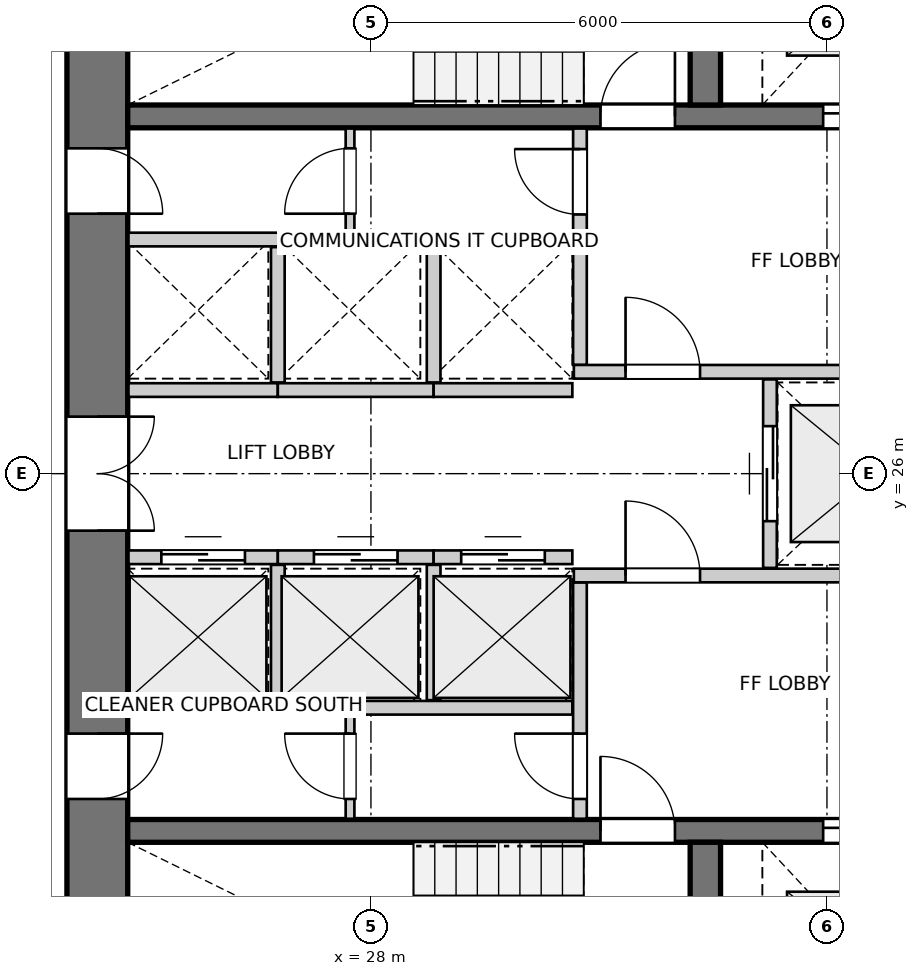
"""IFC4 building model, lengths in metres.
Left out: names, types, materials, properties, quantities, classifications, styles, units other than length and angle.
Written with IfcOpenShell. Run it as: python <this file> out.ifc"""

import sys

from ifc_helpers import new_model, si_unit, direction, frame, frame_2d, origin, place, context, subcontext, project, spatial, rectangle, extrude, source, transform, mapped, element, fill, save


model = new_model("IFC4")
c1 = context("Model", 3, precision=1e-05, world=origin(), true_north=direction((0.0, 1.0)))
c2 = subcontext(c1, "Body", "Model", "MODEL_VIEW")
j1 = project(units=[si_unit("LENGTHUNIT", "METRE"), si_unit("PLANEANGLEUNIT", "RADIAN")], contexts=[c1])
p1 = place(None, origin())
s1 = spatial("IfcSite", under=j1, at=p1, CompositionType="ELEMENT")
p2 = place(p1, origin())
s2 = spatial("IfcBuilding", under=s1, at=p2, CompositionType="ELEMENT")
p3 = place(p2, frame((0.0, 0.0, 17.4)))
s3 = spatial("IfcBuildingStorey", under=s2, at=p3, CompositionType="ELEMENT", Elevation=17.4)
p4 = place(p3, frame((24.4, 33.8, 0.0), z_axis=(0.0, 0.0, 1.0), x_axis=(0.0, -1.0, 0.0)))
e1 = element("IfcWall", 1, at=p4, inside=s3, PredefinedType="SHEAR", context=c2, shape_type="SweptSolid", body=[
    extrude(rectangle(XDim=15.6, YDim=0.8, at=frame_2d((7.8, 0.0))), origin(), (0.0, 0.0, 1.0), 2.94),
])
p5 = place(p4, frame((7.05, 0.0, 0.0)))
e2 = element("IfcOpeningElement", 2, at=p5, cuts=e1, PredefinedType="OPENING", context=c2, shape_type="SweptSolid", body=[
    extrude(rectangle(XDim=1.5, YDim=2.15, at=frame_2d((0.75, 1.075))), frame((0.0, 0.41, 0.0), z_axis=(0.0, -1.0, 0.0), x_axis=(1.0, 0.0, 0.0)), (0.0, 0.0, 1.0), 0.82),
])
p6 = place(p4, frame((3.52, 0.0, 0.0)))
e3 = element("IfcOpeningElement", 3, at=p6, cuts=e1, PredefinedType="OPENING", context=c2, shape_type="SweptSolid", body=[
    extrude(rectangle(XDim=0.86, YDim=2.05, at=frame_2d((0.43, 1.025))), frame((0.0, 0.41, 0.0), z_axis=(0.0, -1.0, 0.0), x_axis=(1.0, 0.0, 0.0)), (0.0, 0.0, 1.0), 0.82),
])
p7 = place(p4, frame((11.22, 0.0, 0.0)))
e4 = element("IfcOpeningElement", 4, at=p7, cuts=e1, PredefinedType="OPENING", context=c2, shape_type="SweptSolid", body=[
    extrude(rectangle(XDim=0.86, YDim=2.05, at=frame_2d((0.43, 1.025))), frame((0.0, 0.41, 0.0), z_axis=(0.0, -1.0, 0.0), x_axis=(1.0, 0.0, 0.0)), (0.0, 0.0, 1.0), 0.82),
])
p8 = place(p3, frame((24.8, 21.3, 0.0), z_axis=(0.0, 0.0, 1.0), x_axis=(1.0, 0.0, 0.0)))
e5 = element("IfcWall", 5, at=p8, inside=s3, PredefinedType="SHEAR", context=c2, shape_type="SweptSolid", body=[
    extrude(rectangle(XDim=11.1, YDim=0.3, at=frame_2d((5.55, 0.0))), origin(), (0.0, 0.0, 1.0), 2.94),
])
p9 = place(p8, frame((6.22, 0.0, 0.0)))
e6 = element("IfcOpeningElement", 6, at=p9, cuts=e5, PredefinedType="OPENING", context=c2, shape_type="SweptSolid", body=[
    extrude(rectangle(XDim=0.98, YDim=2.15, at=frame_2d((0.49, 1.075))), frame((0.0, 0.16, 0.0), z_axis=(0.0, -1.0, 0.0), x_axis=(1.0, 0.0, 0.0)), (0.0, 0.0, 1.0), 0.32),
])
p10 = place(p8, frame((9.15, 0.0, 0.0)))
e7 = element("IfcOpeningElement", 7, at=p10, cuts=e5, PredefinedType="OPENING", context=c2, shape_type="SweptSolid", body=[
    extrude(rectangle(XDim=1.15, YDim=2.15, at=frame_2d((0.575, 1.075))), frame((0.0, 0.16, 0.0), z_axis=(0.0, -1.0, 0.0), x_axis=(1.0, 0.0, 0.0)), (0.0, 0.0, 1.0), 0.32),
])
p11 = place(p3, frame((32.4, 18.2, 0.0), z_axis=(0.0, 0.0, 1.0), x_axis=(0.0, 1.0, 0.0)))
e8 = element("IfcWall", 8, at=p11, inside=s3, PredefinedType="SHEAR", context=c2, shape_type="SweptSolid", body=[
    extrude(rectangle(XDim=2.95, YDim=0.4, at=frame_2d((1.475, 0.0))), origin(), (0.0, 0.0, 1.0), 2.94),
])
p12 = place(p3, frame((24.8, 30.7, 0.0), z_axis=(0.0, 0.0, 1.0), x_axis=(1.0, 0.0, 0.0)))
e9 = element("IfcWall", 9, at=p12, inside=s3, PredefinedType="SHEAR", context=c2, shape_type="SweptSolid", body=[
    extrude(rectangle(XDim=11.1, YDim=0.3, at=frame_2d((5.55, 0.0))), origin(), (0.0, 0.0, 1.0), 2.94),
])
p13 = place(p12, frame((6.22, 0.0, 0.0)))
e10 = element("IfcOpeningElement", 10, at=p13, cuts=e9, PredefinedType="OPENING", context=c2, shape_type="SweptSolid", body=[
    extrude(rectangle(XDim=0.98, YDim=2.15, at=frame_2d((0.49, 1.075))), frame((0.0, 0.16, 0.0), z_axis=(0.0, -1.0, 0.0), x_axis=(1.0, 0.0, 0.0)), (0.0, 0.0, 1.0), 0.32),
])
p14 = place(p12, frame((9.15, 0.0, 0.0)))
e11 = element("IfcOpeningElement", 11, at=p14, cuts=e9, PredefinedType="OPENING", context=c2, shape_type="SweptSolid", body=[
    extrude(rectangle(XDim=1.15, YDim=2.15, at=frame_2d((0.575, 1.075))), frame((0.0, 0.16, 0.0), z_axis=(0.0, -1.0, 0.0), x_axis=(1.0, 0.0, 0.0)), (0.0, 0.0, 1.0), 0.32),
])
p15 = place(p3, frame((32.4, 30.85, 0.0), z_axis=(0.0, 0.0, 1.0), x_axis=(0.0, 1.0, 0.0)))
e12 = element("IfcWall", 12, at=p15, inside=s3, PredefinedType="SHEAR", context=c2, shape_type="SweptSolid", body=[
    extrude(rectangle(XDim=2.95, YDim=0.4, at=frame_2d((1.475, 0.0))), origin(), (0.0, 0.0, 1.0), 2.94),
])
p16 = place(p3, frame((30.75, 21.46, 0.0), z_axis=(0.0, 0.0, 1.0), x_axis=(0.0, 1.0, 0.0)))
e13 = element("IfcWall", 13, at=p16, inside=s3, PredefinedType="PARTITIONING", context=c2, shape_type="SweptSolid", body=[
    extrude(rectangle(XDim=3.11, YDim=0.18, at=frame_2d((1.555, 0.0))), origin(), (0.0, 0.0, 1.0), 2.94),
])
p17 = place(p16, frame((0.26, 0.0, 0.0)))
e14 = element("IfcOpeningElement", 14, at=p17, cuts=e13, PredefinedType="OPENING", context=c2, shape_type="SweptSolid", body=[
    extrude(rectangle(XDim=0.86, YDim=2.05, at=frame_2d((0.43, 1.025))), frame((0.0, 0.1, 0.0), z_axis=(0.0, -1.0, 0.0), x_axis=(1.0, 0.0, 0.0)), (0.0, 0.0, 1.0), 0.2),
])
p18 = place(p3, frame((30.67, 24.66, 0.0), z_axis=(0.0, 0.0, 1.0), x_axis=(1.0, 0.0, 0.0)))
e15 = element("IfcWall", 15, at=p18, inside=s3, PredefinedType="PARTITIONING", context=c2, shape_type="SweptSolid", body=[
    extrude(rectangle(XDim=5.22, YDim=0.18, at=frame_2d((2.61, 0.0))), origin(), (0.0, 0.0, 1.0), 2.94),
])
p19 = place(p18, frame((0.68, 0.0, 0.0)))
e16 = element("IfcOpeningElement", 16, at=p19, cuts=e15, PredefinedType="OPENING", context=c2, shape_type="SweptSolid", body=[
    extrude(rectangle(XDim=0.98, YDim=2.15, at=frame_2d((0.49, 1.075))), frame((0.0, 0.1, 0.0), z_axis=(0.0, -1.0, 0.0), x_axis=(1.0, 0.0, 0.0)), (0.0, 0.0, 1.0), 0.2),
])
p20 = place(p3, frame((30.75, 27.43, 0.0), z_axis=(0.0, 0.0, 1.0), x_axis=(0.0, 1.0, 0.0)))
e17 = element("IfcWall", 17, at=p20, inside=s3, PredefinedType="PARTITIONING", context=c2, shape_type="SweptSolid", body=[
    extrude(rectangle(XDim=3.11, YDim=0.18, at=frame_2d((1.555, 0.0))), origin(), (0.0, 0.0, 1.0), 2.94),
])
p21 = place(p20, frame((1.98, 0.0, 0.0)))
e18 = element("IfcOpeningElement", 18, at=p21, cuts=e17, PredefinedType="OPENING", context=c2, shape_type="SweptSolid", body=[
    extrude(rectangle(XDim=0.86, YDim=2.05, at=frame_2d((0.43, 1.025))), frame((0.0, 0.1, 0.0), z_axis=(0.0, -1.0, 0.0), x_axis=(1.0, 0.0, 0.0)), (0.0, 0.0, 1.0), 0.2),
])
p22 = place(p3, frame((30.67, 27.34, 0.0), z_axis=(0.0, 0.0, 1.0), x_axis=(1.0, 0.0, 0.0)))
e19 = element("IfcWall", 19, at=p22, inside=s3, PredefinedType="PARTITIONING", context=c2, shape_type="SweptSolid", body=[
    extrude(rectangle(XDim=5.22, YDim=0.18, at=frame_2d((2.61, 0.0))), origin(), (0.0, 0.0, 1.0), 2.94),
])
p23 = place(p22, frame((0.68, 0.0, 0.0)))
e20 = element("IfcOpeningElement", 20, at=p23, cuts=e19, PredefinedType="OPENING", context=c2, shape_type="SweptSolid", body=[
    extrude(rectangle(XDim=0.98, YDim=2.15, at=frame_2d((0.49, 1.075))), frame((0.0, 0.1, 0.0), z_axis=(0.0, -1.0, 0.0), x_axis=(1.0, 0.0, 0.0)), (0.0, 0.0, 1.0), 0.2),
])
p24 = place(p3, frame((33.25, 24.76, 0.0), z_axis=(0.0, 0.0, 1.0), x_axis=(0.0, 1.0, 0.0)))
e21 = element("IfcWall", 21, at=p24, inside=s3, PredefinedType="PARTITIONING", context=c2, shape_type="SweptSolid", body=[
    extrude(rectangle(XDim=2.48, YDim=0.18, at=frame_2d((1.24, 0.0))), origin(), (0.0, 0.0, 1.0), 2.94),
])
p25 = place(p24, frame((0.615, 0.0, 0.0)))
e22 = element("IfcOpeningElement", 22, at=p25, cuts=e21, PredefinedType="OPENING", context=c2, shape_type="SweptSolid", body=[
    extrude(rectangle(XDim=1.25, YDim=2.15, at=frame_2d((0.625, 1.075))), frame((0.0, 0.1, 0.0), z_axis=(0.0, -1.0, 0.0), x_axis=(1.0, 0.0, 0.0)), (0.0, 0.0, 1.0), 0.2),
])
p26 = place(p3, frame((24.81, 22.92, 0.0), z_axis=(0.0, 0.0, 1.0), x_axis=(1.0, 0.0, 0.0)))
e23 = element("IfcWall", 23, at=p26, inside=s3, PredefinedType="PARTITIONING", context=c2, shape_type="SweptSolid", body=[
    extrude(rectangle(XDim=5.84, YDim=0.18, at=frame_2d((2.92, 0.0))), origin(), (0.0, 0.0, 1.0), 2.94),
])
p27 = place(p3, frame((24.81, 24.9, 0.0), z_axis=(0.0, 0.0, 1.0), x_axis=(1.0, 0.0, 0.0)))
e24 = element("IfcWall", 24, at=p27, inside=s3, PredefinedType="PARTITIONING", context=c2, shape_type="SweptSolid", body=[
    extrude(rectangle(XDim=1.965, YDim=0.18, at=frame_2d((0.982, 0.0))), origin(), (0.0, 0.0, 1.0), 2.94),
])
p28 = place(p27, frame((0.433, 0.0, 0.0)))
e25 = element("IfcOpeningElement", 25, at=p28, cuts=e24, PredefinedType="OPENING", context=c2, shape_type="SweptSolid", body=[
    extrude(rectangle(XDim=1.1, YDim=2.15, at=frame_2d((0.55, 1.075))), frame((0.0, 0.1, 0.0), z_axis=(0.0, -1.0, 0.0), x_axis=(1.0, 0.0, 0.0)), (0.0, 0.0, 1.0), 0.2),
])
p29 = place(p3, frame((26.775, 24.9, 0.0), z_axis=(0.0, 0.0, 1.0), x_axis=(1.0, 0.0, 0.0)))
e26 = element("IfcWall", 26, at=p29, inside=s3, PredefinedType="PARTITIONING", context=c2, shape_type="SweptSolid", body=[
    extrude(rectangle(XDim=2.05, YDim=0.18, at=frame_2d((1.025, 0.0))), origin(), (0.0, 0.0, 1.0), 2.94),
])
p30 = place(p29, frame((0.475, 0.0, 0.0)))
e27 = element("IfcOpeningElement", 27, at=p30, cuts=e26, PredefinedType="OPENING", context=c2, shape_type="SweptSolid", body=[
    extrude(rectangle(XDim=1.1, YDim=2.15, at=frame_2d((0.55, 1.075))), frame((0.0, 0.1, 0.0), z_axis=(0.0, -1.0, 0.0), x_axis=(1.0, 0.0, 0.0)), (0.0, 0.0, 1.0), 0.2),
])
p31 = place(p3, frame((26.775, 23.02, 0.0), z_axis=(0.0, 0.0, 1.0), x_axis=(0.0, 1.0, 0.0)))
e28 = element("IfcWall", 28, at=p31, inside=s3, PredefinedType="PARTITIONING", context=c2, shape_type="SweptSolid", body=[
    extrude(rectangle(XDim=1.78, YDim=0.18, at=frame_2d((0.89, 0.0))), origin(), (0.0, 0.0, 1.0), 2.94),
])
p32 = place(p3, frame((28.825, 24.9, 0.0), z_axis=(0.0, 0.0, 1.0), x_axis=(1.0, 0.0, 0.0)))
e29 = element("IfcWall", 29, at=p32, inside=s3, PredefinedType="PARTITIONING", context=c2, shape_type="SweptSolid", body=[
    extrude(rectangle(XDim=1.825, YDim=0.18, at=frame_2d((0.913, 0.0))), origin(), (0.0, 0.0, 1.0), 2.94),
])
p33 = place(p32, frame((0.363, 0.0, 0.0)))
e30 = element("IfcOpeningElement", 30, at=p33, cuts=e29, PredefinedType="OPENING", context=c2, shape_type="SweptSolid", body=[
    extrude(rectangle(XDim=1.1, YDim=2.15, at=frame_2d((0.55, 1.075))), frame((0.0, 0.1, 0.0), z_axis=(0.0, -1.0, 0.0), x_axis=(1.0, 0.0, 0.0)), (0.0, 0.0, 1.0), 0.2),
])
p34 = place(p3, frame((28.825, 23.02, 0.0), z_axis=(0.0, 0.0, 1.0), x_axis=(0.0, 1.0, 0.0)))
e31 = element("IfcWall", 31, at=p34, inside=s3, PredefinedType="PARTITIONING", context=c2, shape_type="SweptSolid", body=[
    extrude(rectangle(XDim=1.78, YDim=0.18, at=frame_2d((0.89, 0.0))), origin(), (0.0, 0.0, 1.0), 2.94),
])
p35 = place(p3, frame((24.81, 29.08, 0.0), z_axis=(0.0, 0.0, 1.0), x_axis=(1.0, 0.0, 0.0)))
e32 = element("IfcWall", 32, at=p35, inside=s3, PredefinedType="PARTITIONING", context=c2, shape_type="SweptSolid", body=[
    extrude(rectangle(XDim=5.84, YDim=0.18, at=frame_2d((2.92, 0.0))), origin(), (0.0, 0.0, 1.0), 2.94),
])
p36 = place(p3, frame((24.81, 27.1, 0.0), z_axis=(0.0, 0.0, 1.0), x_axis=(1.0, 0.0, 0.0)))
e33 = element("IfcWall", 33, at=p36, inside=s3, PredefinedType="PARTITIONING", context=c2, shape_type="SweptSolid", body=[
    extrude(rectangle(XDim=1.965, YDim=0.18, at=frame_2d((0.982, 0.0))), origin(), (0.0, 0.0, 1.0), 2.94),
])
p37 = place(p3, frame((26.775, 27.1, 0.0), z_axis=(0.0, 0.0, 1.0), x_axis=(1.0, 0.0, 0.0)))
e34 = element("IfcWall", 34, at=p37, inside=s3, PredefinedType="PARTITIONING", context=c2, shape_type="SweptSolid", body=[
    extrude(rectangle(XDim=2.05, YDim=0.18, at=frame_2d((1.025, 0.0))), origin(), (0.0, 0.0, 1.0), 2.94),
])
p38 = place(p3, frame((26.775, 27.2, 0.0), z_axis=(0.0, 0.0, 1.0), x_axis=(0.0, 1.0, 0.0)))
e35 = element("IfcWall", 35, at=p38, inside=s3, PredefinedType="PARTITIONING", context=c2, shape_type="SweptSolid", body=[
    extrude(rectangle(XDim=1.78, YDim=0.18, at=frame_2d((0.89, 0.0))), origin(), (0.0, 0.0, 1.0), 2.94),
])
p39 = place(p3, frame((28.825, 27.1, 0.0), z_axis=(0.0, 0.0, 1.0), x_axis=(1.0, 0.0, 0.0)))
e36 = element("IfcWall", 36, at=p39, inside=s3, PredefinedType="PARTITIONING", context=c2, shape_type="SweptSolid", body=[
    extrude(rectangle(XDim=1.825, YDim=0.18, at=frame_2d((0.913, 0.0))), origin(), (0.0, 0.0, 1.0), 2.94),
])
p40 = place(p3, frame((28.825, 27.2, 0.0), z_axis=(0.0, 0.0, 1.0), x_axis=(0.0, 1.0, 0.0)))
e37 = element("IfcWall", 37, at=p40, inside=s3, PredefinedType="PARTITIONING", context=c2, shape_type="SweptSolid", body=[
    extrude(rectangle(XDim=1.78, YDim=0.18, at=frame_2d((0.89, 0.0))), origin(), (0.0, 0.0, 1.0), 2.94),
])
p41 = place(p3, frame((27.725, 21.46, 0.0), z_axis=(0.0, 0.0, 1.0), x_axis=(0.0, 1.0, 0.0)))
e38 = element("IfcWall", 38, at=p41, inside=s3, PredefinedType="PARTITIONING", context=c2, shape_type="SweptSolid", body=[
    extrude(rectangle(XDim=1.38, YDim=0.115, at=frame_2d((0.69, 0.0))), origin(), (0.0, 0.0, 1.0), 2.94),
])
p42 = place(p41, frame((0.26, 0.0, 0.0)))
e39 = element("IfcOpeningElement", 39, at=p42, cuts=e38, PredefinedType="OPENING", context=c2, shape_type="SweptSolid", body=[
    extrude(rectangle(XDim=0.86, YDim=2.05, at=frame_2d((0.43, 1.025))), frame((0.0, 0.067, 0.0), z_axis=(0.0, -1.0, 0.0), x_axis=(1.0, 0.0, 0.0)), (0.0, 0.0, 1.0), 0.135),
])
p43 = place(p3, frame((27.725, 29.16, 0.0), z_axis=(0.0, 0.0, 1.0), x_axis=(0.0, 1.0, 0.0)))
e40 = element("IfcWall", 40, at=p43, inside=s3, PredefinedType="PARTITIONING", context=c2, shape_type="SweptSolid", body=[
    extrude(rectangle(XDim=1.38, YDim=0.115, at=frame_2d((0.69, 0.0))), origin(), (0.0, 0.0, 1.0), 2.94),
])
p44 = place(p43, frame((0.26, 0.0, 0.0)))
e41 = element("IfcOpeningElement", 41, at=p44, cuts=e40, PredefinedType="OPENING", context=c2, shape_type="SweptSolid", body=[
    extrude(rectangle(XDim=0.86, YDim=2.05, at=frame_2d((0.43, 1.025))), frame((0.0, 0.067, 0.0), z_axis=(0.0, -1.0, 0.0), x_axis=(1.0, 0.0, 0.0)), (0.0, 0.0, 1.0), 0.135),
])
m1 = source(origin(), c2, "Body", "SweptSolid", [
    extrude(rectangle(XDim=0.98, YDim=2.15, at=frame_2d((0.49, 1.075))), frame((0.0, 0.025, 0.0), z_axis=(0.0, -1.0, 0.0), x_axis=(1.0, 0.0, 0.0)), (0.0, 0.0, 1.0), 0.05),
])
p45 = place(p9, origin())
e42 = element("IfcDoor", 42, at=p45, inside=s3, OperationType="SINGLE_SWING_LEFT", PredefinedType="DOOR", context=c2, shape_type="MappedRepresentation", body=[
    mapped(m1, transform((0.0, 0.0, 0.0), x_axis=(1.0, 0.0, 0.0), y_axis=(0.0, 1.0, 0.0), z_axis=(0.0, 0.0, 1.0), scale=1.0)),
])
fill(e6, e42)
m2 = source(origin(), c2, "Body", "SweptSolid", [
    extrude(rectangle(XDim=1.15, YDim=2.15, at=frame_2d((0.575, 1.075))), frame((0.0, 0.025, 0.0), z_axis=(0.0, -1.0, 0.0), x_axis=(1.0, 0.0, 0.0)), (0.0, 0.0, 1.0), 0.05),
])
p46 = place(p10, origin())
e43 = element("IfcDoor", 43, at=p46, inside=s3, OperationType="DOUBLE_DOOR_SLIDING", PredefinedType="DOOR", context=c2, shape_type="MappedRepresentation", body=[
    mapped(m2, transform((0.0, 0.0, 0.0), x_axis=(1.0, 0.0, 0.0), y_axis=(0.0, 1.0, 0.0), z_axis=(0.0, 0.0, 1.0), scale=1.0)),
])
fill(e7, e43)
p47 = place(p13, origin())
e44 = element("IfcDoor", 44, at=p47, inside=s3, OperationType="SINGLE_SWING_RIGHT", PredefinedType="DOOR", context=c2, shape_type="MappedRepresentation", body=[
    mapped(m1, transform((0.0, 0.0, 0.0), x_axis=(1.0, 0.0, 0.0), y_axis=(0.0, 1.0, 0.0), z_axis=(0.0, 0.0, 1.0), scale=1.0)),
])
fill(e10, e44)
p48 = place(p14, origin())
e45 = element("IfcDoor", 45, at=p48, inside=s3, OperationType="DOUBLE_DOOR_SLIDING", PredefinedType="DOOR", context=c2, shape_type="MappedRepresentation", body=[
    mapped(m2, transform((0.0, 0.0, 0.0), x_axis=(1.0, 0.0, 0.0), y_axis=(0.0, 1.0, 0.0), z_axis=(0.0, 0.0, 1.0), scale=1.0)),
])
fill(e11, e45)
m3 = source(origin(), c2, "Body", "SweptSolid", [
    extrude(rectangle(XDim=1.5, YDim=2.15, at=frame_2d((0.75, 1.075))), frame((0.0, 0.025, 0.0), z_axis=(0.0, -1.0, 0.0), x_axis=(1.0, 0.0, 0.0)), (0.0, 0.0, 1.0), 0.05),
])
p49 = place(p5, origin())
e46 = element("IfcDoor", 46, at=p49, inside=s3, OperationType="DOUBLE_DOOR_SINGLE_SWING", PredefinedType="DOOR", context=c2, shape_type="MappedRepresentation", body=[
    mapped(m3, transform((0.0, 0.0, 0.0), x_axis=(1.0, 0.0, 0.0), y_axis=(0.0, 1.0, 0.0), z_axis=(0.0, 0.0, 1.0), scale=1.0)),
])
fill(e2, e46)
m4 = source(origin(), c2, "Body", "SweptSolid", [
    extrude(rectangle(XDim=0.86, YDim=2.05, at=frame_2d((0.43, 1.025))), frame((0.0, 0.025, 0.0), z_axis=(0.0, -1.0, 0.0), x_axis=(1.0, 0.0, 0.0)), (0.0, 0.0, 1.0), 0.05),
])
p50 = place(p6, origin())
e47 = element("IfcDoor", 47, at=p50, inside=s3, OperationType="SINGLE_SWING_RIGHT", PredefinedType="DOOR", context=c2, shape_type="MappedRepresentation", body=[
    mapped(m4, transform((0.0, 0.0, 0.0), x_axis=(1.0, 0.0, 0.0), y_axis=(0.0, 1.0, 0.0), z_axis=(0.0, 0.0, 1.0), scale=1.0)),
])
fill(e3, e47)
p51 = place(p7, origin())
e48 = element("IfcDoor", 48, at=p51, inside=s3, OperationType="SINGLE_SWING_LEFT", PredefinedType="DOOR", context=c2, shape_type="MappedRepresentation", body=[
    mapped(m4, transform((0.0, 0.0, 0.0), x_axis=(1.0, 0.0, 0.0), y_axis=(0.0, 1.0, 0.0), z_axis=(0.0, 0.0, 1.0), scale=1.0)),
])
fill(e4, e48)
p52 = place(p17, origin())
e49 = element("IfcDoor", 49, at=p52, inside=s3, OperationType="SINGLE_SWING_RIGHT", PredefinedType="DOOR", context=c2, shape_type="MappedRepresentation", body=[
    mapped(m4, transform((0.0, 0.0, 0.0), x_axis=(1.0, 0.0, 0.0), y_axis=(0.0, 1.0, 0.0), z_axis=(0.0, 0.0, 1.0), scale=1.0)),
])
fill(e14, e49)
p53 = place(p19, origin())
e50 = element("IfcDoor", 50, at=p53, inside=s3, OperationType="SINGLE_SWING_LEFT", PredefinedType="DOOR", context=c2, shape_type="MappedRepresentation", body=[
    mapped(m1, transform((0.0, 0.0, 0.0), x_axis=(1.0, 0.0, 0.0), y_axis=(0.0, 1.0, 0.0), z_axis=(0.0, 0.0, 1.0), scale=1.0)),
])
fill(e16, e50)
p54 = place(p21, origin())
e51 = element("IfcDoor", 51, at=p54, inside=s3, OperationType="SINGLE_SWING_RIGHT", PredefinedType="DOOR", context=c2, shape_type="MappedRepresentation", body=[
    mapped(m4, transform((0.0, 0.0, 0.0), x_axis=(1.0, 0.0, 0.0), y_axis=(0.0, 1.0, 0.0), z_axis=(0.0, 0.0, 1.0), scale=1.0)),
])
fill(e18, e51)
p55 = place(p23, origin())
e52 = element("IfcDoor", 52, at=p55, inside=s3, OperationType="SINGLE_SWING_LEFT", PredefinedType="DOOR", context=c2, shape_type="MappedRepresentation", body=[
    mapped(m1, transform((0.0, 0.0, 0.0), x_axis=(1.0, 0.0, 0.0), y_axis=(0.0, 1.0, 0.0), z_axis=(0.0, 0.0, 1.0), scale=1.0)),
])
fill(e20, e52)
m5 = source(origin(), c2, "Body", "SweptSolid", [
    extrude(rectangle(XDim=1.25, YDim=2.15, at=frame_2d((0.625, 1.075))), frame((0.0, 0.025, 0.0), z_axis=(0.0, -1.0, 0.0), x_axis=(1.0, 0.0, 0.0)), (0.0, 0.0, 1.0), 0.05),
])
p56 = place(p25, origin())
e53 = element("IfcDoor", 53, at=p56, inside=s3, OperationType="DOUBLE_DOOR_SLIDING", PredefinedType="DOOR", context=c2, shape_type="MappedRepresentation", body=[
    mapped(m5, transform((0.0, 0.0, 0.0), x_axis=(1.0, 0.0, 0.0), y_axis=(0.0, 1.0, 0.0), z_axis=(0.0, 0.0, 1.0), scale=1.0)),
])
fill(e22, e53)
m6 = source(origin(), c2, "Body", "SweptSolid", [
    extrude(rectangle(XDim=1.1, YDim=2.15, at=frame_2d((0.55, 1.075))), frame((0.0, 0.025, 0.0), z_axis=(0.0, -1.0, 0.0), x_axis=(1.0, 0.0, 0.0)), (0.0, 0.0, 1.0), 0.05),
])
p57 = place(p28, origin())
e54 = element("IfcDoor", 54, at=p57, inside=s3, OperationType="DOUBLE_DOOR_SLIDING", PredefinedType="DOOR", context=c2, shape_type="MappedRepresentation", body=[
    mapped(m6, transform((0.0, 0.0, 0.0), x_axis=(1.0, 0.0, 0.0), y_axis=(0.0, 1.0, 0.0), z_axis=(0.0, 0.0, 1.0), scale=1.0)),
])
fill(e25, e54)
p58 = place(p30, origin())
e55 = element("IfcDoor", 55, at=p58, inside=s3, OperationType="DOUBLE_DOOR_SLIDING", PredefinedType="DOOR", context=c2, shape_type="MappedRepresentation", body=[
    mapped(m6, transform((0.0, 0.0, 0.0), x_axis=(1.0, 0.0, 0.0), y_axis=(0.0, 1.0, 0.0), z_axis=(0.0, 0.0, 1.0), scale=1.0)),
])
fill(e27, e55)
p59 = place(p33, origin())
e56 = element("IfcDoor", 56, at=p59, inside=s3, OperationType="DOUBLE_DOOR_SLIDING", PredefinedType="DOOR", context=c2, shape_type="MappedRepresentation", body=[
    mapped(m6, transform((0.0, 0.0, 0.0), x_axis=(1.0, 0.0, 0.0), y_axis=(0.0, 1.0, 0.0), z_axis=(0.0, 0.0, 1.0), scale=1.0)),
])
fill(e30, e56)
p60 = place(p42, origin())
e57 = element("IfcDoor", 57, at=p60, inside=s3, OperationType="SINGLE_SWING_RIGHT", PredefinedType="DOOR", context=c2, shape_type="MappedRepresentation", body=[
    mapped(m4, transform((0.0, 0.0, 0.0), x_axis=(1.0, 0.0, 0.0), y_axis=(0.0, 1.0, 0.0), z_axis=(0.0, 0.0, 1.0), scale=1.0)),
])
fill(e39, e57)
p61 = place(p44, origin())
e58 = element("IfcDoor", 58, at=p61, inside=s3, OperationType="SINGLE_SWING_LEFT", PredefinedType="DOOR", context=c2, shape_type="MappedRepresentation", body=[
    mapped(m4, transform((0.0, 0.0, 0.0), x_axis=(1.0, 0.0, 0.0), y_axis=(0.0, 1.0, 0.0), z_axis=(0.0, 0.0, 1.0), scale=1.0)),
])
fill(e41, e58)
save(model, sys.argv[1])
